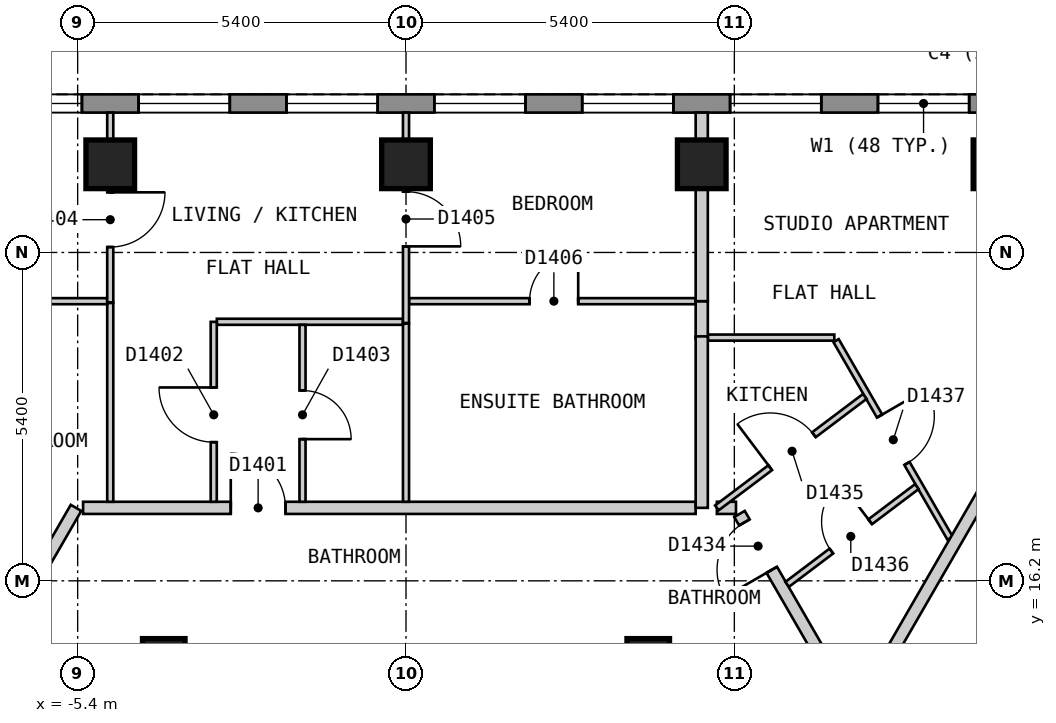
"""IFC4 building model, lengths in metres.
Left out: names, types, materials, properties, quantities, classifications, styles, units other than length and angle.
Written with IfcOpenShell. Run it as: python <this file> out.ifc"""

import sys

from ifc_helpers import new_model, si_unit, direction, frame, frame_2d, origin, origin_2d, place, context, subcontext, project, spatial, polyline, rectangle, outline, extrude, element, fill, save


model = new_model("IFC4")
c1 = context("Model", 3, precision=1e-05, world=origin(), true_north=direction((0.0, 1.0)))
c2 = subcontext(c1, "Body", "Model", "MODEL_VIEW")
j1 = project(units=[si_unit("LENGTHUNIT", "METRE"), si_unit("PLANEANGLEUNIT", "RADIAN")], contexts=[c1])
p1 = place(None, origin())
s1 = spatial("IfcSite", under=j1, at=p1, CompositionType="ELEMENT")
p2 = place(p1, origin())
s2 = spatial("IfcBuilding", under=s1, at=p2, CompositionType="ELEMENT")
p3 = place(p2, frame((0.0, 0.0, 178.2)))
s3 = spatial("IfcBuildingStorey", under=s2, at=p3, CompositionType="ELEMENT", Elevation=178.2)
for number, where, z_axis, x_axis in (
    (1, (9.728, 23.05, 0.0), (0.0, 0.0, 1.0), (-1.0, 0.0, 0.0)),
    (2, (4.864, 23.05, 0.0), (0.0, 0.0, 1.0), (-1.0, 0.0, 0.0)),
    (3, (0.0, 23.05, 0.0), (0.0, 0.0, 1.0), (-1.0, 0.0, 0.0)),
    (4, (-4.864, 23.05, 0.0), (0.0, 0.0, 1.0), (-1.0, 0.0, 0.0)),
):
    element("IfcColumn", number, at=place(p3, frame(where, z_axis=z_axis, x_axis=x_axis)), inside=s3, PredefinedType="COLUMN", context=c2, shape_type="SweptSolid", body=[
        extrude(rectangle(XDim=0.8, YDim=0.8, at=origin_2d()), origin(), (0.0, 0.0, 1.0), 3.0),
    ])
for number, where, z_axis, x_axis in (
    (5, (3.984, 14.9, 0.0), (0.0, 0.0, 1.0), (1.0, 0.0, 0.0)),
    (6, (-3.984, 14.9, 0.0), (0.0, 0.0, 1.0), (1.0, 0.0, 0.0)),
):
    element("IfcColumn", number, at=place(p3, frame(where, z_axis=z_axis, x_axis=x_axis)), inside=s3, PredefinedType="COLUMN", context=c2, shape_type="SweptSolid", body=[
        extrude(rectangle(XDim=0.7, YDim=0.7, at=origin_2d()), origin(), (0.0, 0.0, 1.0), 3.0),
    ])
p4 = place(p3, frame((10.392, 24.05, 0.0), z_axis=(0.0, 0.0, 1.0), x_axis=(-1.0, 0.0, 0.0)))
e7 = element("IfcWall", 7, at=p4, inside=s3, PredefinedType="SOLIDWALL", context=c2, shape_type="SweptSolid", body=[
    extrude(outline(polyline([(0.0, -0.15), (20.784, -0.15), (20.704, 0.15), (0.08, 0.15), (0.0, -0.15)])), origin(), (0.0, 0.0, 1.0), 2.7),
])
p5 = place(p4, frame((1.13, 0.0, 0.15)))
e8 = element("IfcOpeningElement", 8, at=p5, cuts=e7, PredefinedType="OPENING", context=c2, shape_type="SweptSolid", body=[
    extrude(rectangle(XDim=1.5, YDim=2.1, at=frame_2d((0.75, 1.05))), frame((0.0, 0.16, 0.0), z_axis=(0.0, -1.0, 0.0), x_axis=(1.0, 0.0, 0.0)), (0.0, 0.0, 1.0), 0.32),
])
p6 = place(p4, frame((3.562, 0.0, 0.15)))
e9 = element("IfcOpeningElement", 9, at=p6, cuts=e7, PredefinedType="OPENING", context=c2, shape_type="SweptSolid", body=[
    extrude(rectangle(XDim=1.5, YDim=2.1, at=frame_2d((0.75, 1.05))), frame((0.0, 0.16, 0.0), z_axis=(0.0, -1.0, 0.0), x_axis=(1.0, 0.0, 0.0)), (0.0, 0.0, 1.0), 0.32),
])
p7 = place(p4, frame((5.994, 0.0, 0.15)))
e10 = element("IfcOpeningElement", 10, at=p7, cuts=e7, PredefinedType="OPENING", context=c2, shape_type="SweptSolid", body=[
    extrude(rectangle(XDim=1.5, YDim=2.1, at=frame_2d((0.75, 1.05))), frame((0.0, 0.16, 0.0), z_axis=(0.0, -1.0, 0.0), x_axis=(1.0, 0.0, 0.0)), (0.0, 0.0, 1.0), 0.32),
])
p8 = place(p4, frame((8.426, 0.0, 0.15)))
e11 = element("IfcOpeningElement", 11, at=p8, cuts=e7, PredefinedType="OPENING", context=c2, shape_type="SweptSolid", body=[
    extrude(rectangle(XDim=1.5, YDim=2.1, at=frame_2d((0.75, 1.05))), frame((0.0, 0.16, 0.0), z_axis=(0.0, -1.0, 0.0), x_axis=(1.0, 0.0, 0.0)), (0.0, 0.0, 1.0), 0.32),
])
p9 = place(p4, frame((10.858, 0.0, 0.15)))
e12 = element("IfcOpeningElement", 12, at=p9, cuts=e7, PredefinedType="OPENING", context=c2, shape_type="SweptSolid", body=[
    extrude(rectangle(XDim=1.5, YDim=2.1, at=frame_2d((0.75, 1.05))), frame((0.0, 0.16, 0.0), z_axis=(0.0, -1.0, 0.0), x_axis=(1.0, 0.0, 0.0)), (0.0, 0.0, 1.0), 0.32),
])
p10 = place(p4, frame((13.29, 0.0, 0.15)))
e13 = element("IfcOpeningElement", 13, at=p10, cuts=e7, PredefinedType="OPENING", context=c2, shape_type="SweptSolid", body=[
    extrude(rectangle(XDim=1.5, YDim=2.1, at=frame_2d((0.75, 1.05))), frame((0.0, 0.16, 0.0), z_axis=(0.0, -1.0, 0.0), x_axis=(1.0, 0.0, 0.0)), (0.0, 0.0, 1.0), 0.32),
])
p11 = place(p4, frame((15.722, 0.0, 0.15)))
e14 = element("IfcOpeningElement", 14, at=p11, cuts=e7, PredefinedType="OPENING", context=c2, shape_type="SweptSolid", body=[
    extrude(rectangle(XDim=1.5, YDim=2.1, at=frame_2d((0.75, 1.05))), frame((0.0, 0.16, 0.0), z_axis=(0.0, -1.0, 0.0), x_axis=(1.0, 0.0, 0.0)), (0.0, 0.0, 1.0), 0.32),
])
p12 = place(p4, frame((18.154, 0.0, 0.15)))
e15 = element("IfcOpeningElement", 15, at=p12, cuts=e7, PredefinedType="OPENING", context=c2, shape_type="SweptSolid", body=[
    extrude(rectangle(XDim=1.5, YDim=2.1, at=frame_2d((0.75, 1.05))), frame((0.0, 0.16, 0.0), z_axis=(0.0, -1.0, 0.0), x_axis=(1.0, 0.0, 0.0)), (0.0, 0.0, 1.0), 0.32),
])
p13 = place(p3, frame((5.485, 17.3, 0.0), z_axis=(0.0, 0.0, 1.0), x_axis=(0.499965832213, -0.866045129667, 0.0)))
e16 = element("IfcWall", 16, at=p13, inside=s3, PredefinedType="PARTITIONING", context=c2, shape_type="SweptSolid", body=[
    extrude(rectangle(XDim=10.739, YDim=0.2, at=frame_2d((5.369, 0.0))), origin(), (0.0, 0.0, 1.0), 2.7),
])
p14 = place(p13, frame((9.048, 0.0, 0.0)))
e17 = element("IfcOpeningElement", 17, at=p14, cuts=e16, PredefinedType="OPENING", context=c2, shape_type="SweptSolid", body=[
    extrude(rectangle(XDim=1.0, YDim=2.1, at=frame_2d((0.5, 1.05))), frame((0.0, 0.11, 0.0), z_axis=(0.0, -1.0, 0.0), x_axis=(1.0, 0.0, 0.0)), (0.0, 0.0, 1.0), 0.22),
])
p15 = place(p13, frame((0.161, 0.0, 0.0)))
e18 = element("IfcOpeningElement", 18, at=p15, cuts=e16, PredefinedType="OPENING", context=c2, shape_type="SweptSolid", body=[
    extrude(rectangle(XDim=0.9, YDim=2.1, at=frame_2d((0.45, 1.05))), frame((0.0, 0.11, 0.0), z_axis=(0.0, -1.0, 0.0), x_axis=(1.0, 0.0, 0.0)), (0.0, 0.0, 1.0), 0.22),
])
p16 = place(p3, frame((-5.311, 17.4, 0.0), z_axis=(0.0, 0.0, 1.0), x_axis=(1.0, 0.0, 0.0)))
e19 = element("IfcWall", 19, at=p16, inside=s3, PredefinedType="PARTITIONING", context=c2, shape_type="SweptSolid", body=[
    extrude(rectangle(XDim=10.075, YDim=0.2, at=frame_2d((5.038, 0.0))), origin(), (0.0, 0.0, 1.0), 2.7),
])
p17 = place(p16, frame((2.429, 0.0, 0.0)))
e20 = element("IfcOpeningElement", 20, at=p17, cuts=e19, PredefinedType="OPENING", context=c2, shape_type="SweptSolid", body=[
    extrude(rectangle(XDim=0.9, YDim=2.1, at=frame_2d((0.45, 1.05))), frame((0.0, 0.11, 0.0), z_axis=(0.0, -1.0, 0.0), x_axis=(1.0, 0.0, 0.0)), (0.0, 0.0, 1.0), 0.22),
])
p18 = place(p3, frame((5.113, 17.4, 0.0), z_axis=(0.0, 0.0, 1.0), x_axis=(1.0, 0.0, 0.0)))
e21 = element("IfcWall", 21, at=p18, inside=s3, PredefinedType="PARTITIONING", context=c2, shape_type="SweptSolid", body=[
    extrude(rectangle(XDim=0.314, YDim=0.2, at=frame_2d((0.157, 0.0))), origin(), (0.0, 0.0, 1.0), 2.7),
])
p19 = place(p3, frame((-10.854, 8.0, 0.0), z_axis=(0.0, 0.0, 1.0), x_axis=(0.499997637144, 0.866026767976, 0.0)))
e22 = element("IfcWall", 22, at=p19, inside=s3, PredefinedType="PARTITIONING", context=c2, shape_type="SweptSolid", body=[
    extrude(rectangle(XDim=10.854, YDim=0.2, at=frame_2d((5.427, 0.0))), origin(), (0.0, 0.0, 1.0), 2.7),
])
p20 = place(p19, frame((0.721, 0.0, 0.0)))
e23 = element("IfcOpeningElement", 23, at=p20, cuts=e22, PredefinedType="OPENING", context=c2, shape_type="SweptSolid", body=[
    extrude(rectangle(XDim=1.0, YDim=2.1, at=frame_2d((0.5, 1.05))), frame((0.0, 0.11, 0.0), z_axis=(0.0, -1.0, 0.0), x_axis=(1.0, 0.0, 0.0)), (0.0, 0.0, 1.0), 0.22),
])
p21 = place(p3, frame((7.073, 20.15, 0.0), z_axis=(0.0, 0.0, 1.0), x_axis=(0.499917691695, -0.866072919292, 0.0)))
e24 = element("IfcWall", 24, at=p21, inside=s3, PredefinedType="PARTITIONING", context=c2, shape_type="SweptSolid", body=[
    extrude(rectangle(XDim=3.753, YDim=0.1, at=frame_2d((1.876, 0.0))), origin(), (0.0, 0.0, 1.0), 2.7),
])
p22 = place(p21, frame((1.432, 0.0, 0.0)))
e25 = element("IfcOpeningElement", 25, at=p22, cuts=e24, PredefinedType="OPENING", context=c2, shape_type="SweptSolid", body=[
    extrude(rectangle(XDim=0.9, YDim=2.1, at=frame_2d((0.45, 1.05))), frame((0.0, 0.06, 0.0), z_axis=(0.0, -1.0, 0.0), x_axis=(1.0, 0.0, 0.0)), (0.0, 0.0, 1.0), 0.12),
])
p23 = place(p3, frame((-4.864, 20.769, 0.0), z_axis=(0.0, 0.0, 1.0), x_axis=(0.0, -1.0, 0.0)))
e26 = element("IfcWall", 26, at=p23, inside=s3, PredefinedType="PARTITIONING", context=c2, shape_type="SweptSolid", body=[
    extrude(rectangle(XDim=3.269, YDim=0.1, at=frame_2d((1.635, 0.0))), origin(), (0.0, 0.0, 1.0), 2.7),
])
p24 = place(p3, frame((0.0, 20.43, 0.0), z_axis=(0.0, 0.0, 1.0), x_axis=(0.0, -1.0, 0.0)))
e27 = element("IfcWall", 27, at=p24, inside=s3, PredefinedType="PARTITIONING", context=c2, shape_type="SweptSolid", body=[
    extrude(rectangle(XDim=2.93, YDim=0.1, at=frame_2d((1.465, 0.0))), origin(), (0.0, 0.0, 1.0), 2.7),
])
p25 = place(p3, frame((4.964, 20.2, 0.0), z_axis=(0.0, 0.0, 1.0), x_axis=(1.0, 0.0, 0.0)))
e28 = element("IfcWall", 28, at=p25, inside=s3, PredefinedType="PARTITIONING", context=c2, shape_type="SweptSolid", body=[
    extrude(rectangle(XDim=2.08, YDim=0.1, at=frame_2d((1.04, 0.0))), origin(), (0.0, 0.0, 1.0), 2.7),
])
p26 = place(p3, frame((-3.111, 20.46, 0.0), z_axis=(0.0, 0.0, 1.0), x_axis=(1.0, 0.0, 0.0)))
e29 = element("IfcWall", 29, at=p26, inside=s3, PredefinedType="PARTITIONING", context=c2, shape_type="SweptSolid", body=[
    extrude(rectangle(XDim=3.061, YDim=0.1, at=frame_2d((1.531, 0.0))), origin(), (0.0, 0.0, 1.0), 2.7),
])
p27 = place(p3, frame((-7.331, 20.799, 0.0), z_axis=(0.0, 0.0, 1.0), x_axis=(1.0, 0.0, 0.0)))
e30 = element("IfcWall", 30, at=p27, inside=s3, PredefinedType="PARTITIONING", context=c2, shape_type="SweptSolid", body=[
    extrude(rectangle(XDim=2.417, YDim=0.1, at=frame_2d((1.208, 0.0))), origin(), (0.0, 0.0, 1.0), 2.7),
])
p28 = place(p3, frame((0.05, 20.799, 0.0), z_axis=(0.0, 0.0, 1.0), x_axis=(1.0, 0.0, 0.0)))
e31 = element("IfcWall", 31, at=p28, inside=s3, PredefinedType="PARTITIONING", context=c2, shape_type="SweptSolid", body=[
    extrude(rectangle(XDim=4.714, YDim=0.1, at=frame_2d((2.357, 0.0))), origin(), (0.0, 0.0, 1.0), 2.7),
])
p29 = place(p28, frame((1.982, 0.0, 0.0)))
e32 = element("IfcOpeningElement", 32, at=p29, cuts=e31, PredefinedType="OPENING", context=c2, shape_type="SweptSolid", body=[
    extrude(rectangle(XDim=0.8, YDim=2.1, at=frame_2d((0.4, 1.05))), frame((0.0, 0.06, 0.0), z_axis=(0.0, -1.0, 0.0), x_axis=(1.0, 0.0, 0.0)), (0.0, 0.0, 1.0), 0.12),
])
p30 = place(p3, frame((0.0, 20.44, 0.0), z_axis=(0.0, 0.0, 1.0), x_axis=(0.0, 1.0, 0.0)))
e33 = element("IfcWall", 33, at=p30, inside=s3, PredefinedType="PARTITIONING", context=c2, shape_type="SweptSolid", body=[
    extrude(rectangle(XDim=3.46, YDim=0.1, at=frame_2d((1.73, 0.0))), origin(), (0.0, 0.0, 1.0), 2.7),
])
p31 = place(p30, frame((1.26, 0.0, 0.0)))
e34 = element("IfcOpeningElement", 34, at=p31, cuts=e33, PredefinedType="OPENING", context=c2, shape_type="SweptSolid", body=[
    extrude(rectangle(XDim=0.9, YDim=2.1, at=frame_2d((0.45, 1.05))), frame((0.0, 0.06, 0.0), z_axis=(0.0, -1.0, 0.0), x_axis=(1.0, 0.0, 0.0)), (0.0, 0.0, 1.0), 0.12),
])
p32 = place(p3, frame((-3.162, 17.5, 0.0), z_axis=(0.0, 0.0, 1.0), x_axis=(0.0, 1.0, 0.0)))
e35 = element("IfcWall", 35, at=p32, inside=s3, PredefinedType="PARTITIONING", context=c2, shape_type="SweptSolid", body=[
    extrude(rectangle(XDim=2.959, YDim=0.1, at=frame_2d((1.479, 0.0))), origin(), (0.0, 0.0, 1.0), 2.7),
])
p33 = place(p32, frame((0.98, 0.0, 0.0)))
e36 = element("IfcOpeningElement", 36, at=p33, cuts=e35, PredefinedType="OPENING", context=c2, shape_type="SweptSolid", body=[
    extrude(rectangle(XDim=0.9, YDim=2.1, at=frame_2d((0.45, 1.05))), frame((0.0, 0.06, 0.0), z_axis=(0.0, -1.0, 0.0), x_axis=(1.0, 0.0, 0.0)), (0.0, 0.0, 1.0), 0.12),
])
p34 = place(p3, frame((-4.864, 20.779, 0.0), z_axis=(0.0, 0.0, 1.0), x_axis=(0.0, 1.0, 0.0)))
e37 = element("IfcWall", 37, at=p34, inside=s3, PredefinedType="PARTITIONING", context=c2, shape_type="SweptSolid", body=[
    extrude(rectangle(XDim=3.121, YDim=0.1, at=frame_2d((1.561, 0.0))), origin(), (0.0, 0.0, 1.0), 2.7),
])
p35 = place(p34, frame((0.91, 0.0, 0.0)))
e38 = element("IfcOpeningElement", 38, at=p35, cuts=e37, PredefinedType="OPENING", context=c2, shape_type="SweptSolid", body=[
    extrude(rectangle(XDim=0.9, YDim=2.1, at=frame_2d((0.45, 1.05))), frame((0.0, 0.06, 0.0), z_axis=(0.0, -1.0, 0.0), x_axis=(1.0, 0.0, 0.0)), (0.0, 0.0, 1.0), 0.12),
])
p36 = place(p3, frame((-1.702, 17.5, 0.0), z_axis=(0.0, 0.0, 1.0), x_axis=(0.0, 1.0, 0.0)))
e39 = element("IfcWall", 39, at=p36, inside=s3, PredefinedType="PARTITIONING", context=c2, shape_type="SweptSolid", body=[
    extrude(rectangle(XDim=2.91, YDim=0.1, at=frame_2d((1.455, 0.0))), origin(), (0.0, 0.0, 1.0), 2.7),
])
p37 = place(p36, frame((1.03, 0.0, 0.0)))
e40 = element("IfcOpeningElement", 40, at=p37, cuts=e39, PredefinedType="OPENING", context=c2, shape_type="SweptSolid", body=[
    extrude(rectangle(XDim=0.8, YDim=2.1, at=frame_2d((0.4, 1.05))), frame((0.0, 0.06, 0.0), z_axis=(0.0, -1.0, 0.0), x_axis=(1.0, 0.0, 0.0)), (0.0, 0.0, 1.0), 0.12),
])
p38 = place(p3, frame((6.269, 16.142, 0.0), z_axis=(0.0, 0.0, 1.0), x_axis=(0.798549086509, 0.601929693931, 0.0)))
e41 = element("IfcWall", 41, at=p38, inside=s3, PredefinedType="PARTITIONING", context=c2, shape_type="SweptSolid", body=[
    extrude(rectangle(XDim=2.67, YDim=0.1, at=frame_2d((1.335, 0.0))), origin(), (0.0, 0.0, 1.0), 2.7),
])
p39 = place(p38, frame((0.91, 0.0, 0.0)))
e42 = element("IfcOpeningElement", 42, at=p39, cuts=e41, PredefinedType="OPENING", context=c2, shape_type="SweptSolid", body=[
    extrude(rectangle(XDim=0.8, YDim=2.1, at=frame_2d((0.4, 1.05))), frame((0.0, 0.06, 0.0), z_axis=(0.0, -1.0, 0.0), x_axis=(1.0, 0.0, 0.0)), (0.0, 0.0, 1.0), 0.12),
])
p40 = place(p3, frame((5.113, 17.4, 0.0), z_axis=(0.0, 0.0, 1.0), x_axis=(0.798718434647, 0.601704962714, 0.0)))
e43 = element("IfcWall", 43, at=p40, inside=s3, PredefinedType="PARTITIONING", context=c2, shape_type="SweptSolid", body=[
    extrude(rectangle(XDim=3.045, YDim=0.1, at=frame_2d((1.522, 0.0))), origin(), (0.0, 0.0, 1.0), 2.7),
])
p41 = place(p40, frame((1.098, 0.0, 0.0)))
e44 = element("IfcOpeningElement", 44, at=p41, cuts=e43, PredefinedType="OPENING", context=c2, shape_type="SweptSolid", body=[
    extrude(rectangle(XDim=0.9, YDim=2.1, at=frame_2d((0.45, 1.05))), frame((0.0, 0.06, 0.0), z_axis=(0.0, -1.0, 0.0), x_axis=(1.0, 0.0, 0.0)), (0.0, 0.0, 1.0), 0.12),
])
p42 = place(p3, frame((4.864, 20.799, 0.0), z_axis=(0.0, 0.0, 1.0), x_axis=(0.0, -1.0, 0.0)))
e45 = element("IfcWall", 45, at=p42, inside=s3, PredefinedType="PARTITIONING", context=c2, shape_type="SweptSolid", body=[
    extrude(rectangle(XDim=0.619, YDim=0.2, at=frame_2d((0.31, 0.0))), origin(), (0.0, 0.0, 1.0), 2.7),
])
p43 = place(p3, frame((7.448, 14.1, 0.0), z_axis=(0.0, 0.0, 1.0), x_axis=(0.500013426303, 0.866017651966, 0.0)))
e46 = element("IfcWall", 46, at=p43, inside=s3, PredefinedType="PARTITIONING", context=c2, shape_type="SweptSolid", body=[
    extrude(rectangle(XDim=4.358, YDim=0.2, at=frame_2d((2.179, 0.0))), origin(), (0.0, 0.0, 1.0), 2.7),
])
p44 = place(p3, frame((4.864, 17.4, 0.0), z_axis=(0.0, 0.0, 1.0), x_axis=(0.0, 1.0, 0.0)))
e47 = element("IfcWall", 47, at=p44, inside=s3, PredefinedType="PARTITIONING", context=c2, shape_type="SweptSolid", body=[
    extrude(rectangle(XDim=2.82, YDim=0.2, at=frame_2d((1.41, 0.0))), origin(), (0.0, 0.0, 1.0), 2.7),
])
p45 = place(p3, frame((4.864, 20.799, 0.0), z_axis=(0.0, 0.0, 1.0), x_axis=(0.0, 1.0, 0.0)))
e48 = element("IfcWall", 48, at=p45, inside=s3, PredefinedType="PARTITIONING", context=c2, shape_type="SweptSolid", body=[
    extrude(rectangle(XDim=3.101, YDim=0.2, at=frame_2d((1.55, 0.0))), origin(), (0.0, 0.0, 1.0), 2.7),
])
p46 = place(p5, origin())
e49 = element("IfcWindow", 49, at=p46, inside=s3, PartitioningType="SINGLE_PANEL", PredefinedType="WINDOW", context=c2, shape_type="SweptSolid", body=[
    extrude(rectangle(XDim=1.5, YDim=2.1, at=frame_2d((0.75, 1.05))), frame((0.0, 0.03, 0.0), z_axis=(0.0, -1.0, 0.0), x_axis=(1.0, 0.0, 0.0)), (0.0, 0.0, 1.0), 0.06),
])
fill(e8, e49)
p47 = place(p6, origin())
e50 = element("IfcWindow", 50, at=p47, inside=s3, PartitioningType="SINGLE_PANEL", PredefinedType="WINDOW", context=c2, shape_type="SweptSolid", body=[
    extrude(rectangle(XDim=1.5, YDim=2.1, at=frame_2d((0.75, 1.05))), frame((0.0, 0.03, 0.0), z_axis=(0.0, -1.0, 0.0), x_axis=(1.0, 0.0, 0.0)), (0.0, 0.0, 1.0), 0.06),
])
fill(e9, e50)
p48 = place(p7, origin())
e51 = element("IfcWindow", 51, at=p48, inside=s3, PartitioningType="SINGLE_PANEL", PredefinedType="WINDOW", context=c2, shape_type="SweptSolid", body=[
    extrude(rectangle(XDim=1.5, YDim=2.1, at=frame_2d((0.75, 1.05))), frame((0.0, 0.03, 0.0), z_axis=(0.0, -1.0, 0.0), x_axis=(1.0, 0.0, 0.0)), (0.0, 0.0, 1.0), 0.06),
])
fill(e10, e51)
p49 = place(p8, origin())
e52 = element("IfcWindow", 52, at=p49, inside=s3, PartitioningType="SINGLE_PANEL", PredefinedType="WINDOW", context=c2, shape_type="SweptSolid", body=[
    extrude(rectangle(XDim=1.5, YDim=2.1, at=frame_2d((0.75, 1.05))), frame((0.0, 0.03, 0.0), z_axis=(0.0, -1.0, 0.0), x_axis=(1.0, 0.0, 0.0)), (0.0, 0.0, 1.0), 0.06),
])
fill(e11, e52)
p50 = place(p9, origin())
e53 = element("IfcWindow", 53, at=p50, inside=s3, PartitioningType="SINGLE_PANEL", PredefinedType="WINDOW", context=c2, shape_type="SweptSolid", body=[
    extrude(rectangle(XDim=1.5, YDim=2.1, at=frame_2d((0.75, 1.05))), frame((0.0, 0.03, 0.0), z_axis=(0.0, -1.0, 0.0), x_axis=(1.0, 0.0, 0.0)), (0.0, 0.0, 1.0), 0.06),
])
fill(e12, e53)
p51 = place(p10, origin())
e54 = element("IfcWindow", 54, at=p51, inside=s3, PartitioningType="SINGLE_PANEL", PredefinedType="WINDOW", context=c2, shape_type="SweptSolid", body=[
    extrude(rectangle(XDim=1.5, YDim=2.1, at=frame_2d((0.75, 1.05))), frame((0.0, 0.03, 0.0), z_axis=(0.0, -1.0, 0.0), x_axis=(1.0, 0.0, 0.0)), (0.0, 0.0, 1.0), 0.06),
])
fill(e13, e54)
p52 = place(p11, origin())
e55 = element("IfcWindow", 55, at=p52, inside=s3, PartitioningType="SINGLE_PANEL", PredefinedType="WINDOW", context=c2, shape_type="SweptSolid", body=[
    extrude(rectangle(XDim=1.5, YDim=2.1, at=frame_2d((0.75, 1.05))), frame((0.0, 0.03, 0.0), z_axis=(0.0, -1.0, 0.0), x_axis=(1.0, 0.0, 0.0)), (0.0, 0.0, 1.0), 0.06),
])
fill(e14, e55)
p53 = place(p17, origin())
e56 = element("IfcDoor", 56, at=p53, inside=s3, OperationType="SINGLE_SWING_LEFT", PredefinedType="DOOR", context=c2, shape_type="SweptSolid", body=[
    extrude(rectangle(XDim=0.9, YDim=2.1, at=frame_2d((0.45, 1.05))), frame((0.0, 0.025, 0.0), z_axis=(0.0, -1.0, 0.0), x_axis=(1.0, 0.0, 0.0)), (0.0, 0.0, 1.0), 0.05),
])
fill(e20, e56)
p54 = place(p33, origin())
e57 = element("IfcDoor", 57, at=p54, inside=s3, OperationType="SINGLE_SWING_RIGHT", PredefinedType="DOOR", context=c2, shape_type="SweptSolid", body=[
    extrude(rectangle(XDim=0.9, YDim=2.1, at=frame_2d((0.45, 1.05))), frame((0.0, 0.025, 0.0), z_axis=(0.0, -1.0, 0.0), x_axis=(1.0, 0.0, 0.0)), (0.0, 0.0, 1.0), 0.05),
])
fill(e36, e57)
p55 = place(p37, origin())
e58 = element("IfcDoor", 58, at=p55, inside=s3, OperationType="SINGLE_SWING_LEFT", PredefinedType="DOOR", context=c2, shape_type="SweptSolid", body=[
    extrude(rectangle(XDim=0.8, YDim=2.1, at=frame_2d((0.4, 1.05))), frame((0.0, 0.025, 0.0), z_axis=(0.0, -1.0, 0.0), x_axis=(1.0, 0.0, 0.0)), (0.0, 0.0, 1.0), 0.05),
])
fill(e40, e58)
p56 = place(p35, origin())
e59 = element("IfcDoor", 59, at=p56, inside=s3, OperationType="SINGLE_SWING_RIGHT", PredefinedType="DOOR", context=c2, shape_type="SweptSolid", body=[
    extrude(rectangle(XDim=0.9, YDim=2.1, at=frame_2d((0.45, 1.05))), frame((0.0, 0.025, 0.0), z_axis=(0.0, -1.0, 0.0), x_axis=(1.0, 0.0, 0.0)), (0.0, 0.0, 1.0), 0.05),
])
fill(e38, e59)
p57 = place(p31, origin())
e60 = element("IfcDoor", 60, at=p57, inside=s3, OperationType="SINGLE_SWING_LEFT", PredefinedType="DOOR", context=c2, shape_type="SweptSolid", body=[
    extrude(rectangle(XDim=0.9, YDim=2.1, at=frame_2d((0.45, 1.05))), frame((0.0, 0.025, 0.0), z_axis=(0.0, -1.0, 0.0), x_axis=(1.0, 0.0, 0.0)), (0.0, 0.0, 1.0), 0.05),
])
fill(e34, e60)
p58 = place(p29, origin())
e61 = element("IfcDoor", 61, at=p58, inside=s3, OperationType="SINGLE_SWING_RIGHT", PredefinedType="DOOR", context=c2, shape_type="SweptSolid", body=[
    extrude(rectangle(XDim=0.8, YDim=2.1, at=frame_2d((0.4, 1.05))), frame((0.0, 0.025, 0.0), z_axis=(0.0, -1.0, 0.0), x_axis=(1.0, 0.0, 0.0)), (0.0, 0.0, 1.0), 0.05),
])
fill(e32, e61)
p59 = place(p15, origin())
e62 = element("IfcDoor", 62, at=p59, inside=s3, OperationType="SINGLE_SWING_RIGHT", PredefinedType="DOOR", context=c2, shape_type="SweptSolid", body=[
    extrude(rectangle(XDim=0.9, YDim=2.1, at=frame_2d((0.45, 1.05))), frame((0.0, 0.025, 0.0), z_axis=(0.0, -1.0, 0.0), x_axis=(1.0, 0.0, 0.0)), (0.0, 0.0, 1.0), 0.05),
])
fill(e18, e62)
p60 = place(p41, origin())
e63 = element("IfcDoor", 63, at=p60, inside=s3, OperationType="SINGLE_SWING_LEFT", PredefinedType="DOOR", context=c2, shape_type="SweptSolid", body=[
    extrude(rectangle(XDim=0.9, YDim=2.1, at=frame_2d((0.45, 1.05))), frame((0.0, 0.025, 0.0), z_axis=(0.0, -1.0, 0.0), x_axis=(1.0, 0.0, 0.0)), (0.0, 0.0, 1.0), 0.05),
])
fill(e44, e63)
p61 = place(p39, origin())
e64 = element("IfcDoor", 64, at=p61, inside=s3, OperationType="SINGLE_SWING_RIGHT", PredefinedType="DOOR", context=c2, shape_type="SweptSolid", body=[
    extrude(rectangle(XDim=0.8, YDim=2.1, at=frame_2d((0.4, 1.05))), frame((0.0, 0.025, 0.0), z_axis=(0.0, -1.0, 0.0), x_axis=(1.0, 0.0, 0.0)), (0.0, 0.0, 1.0), 0.05),
])
fill(e42, e64)
p62 = place(p22, origin())
e65 = element("IfcDoor", 65, at=p62, inside=s3, OperationType="SINGLE_SWING_LEFT", PredefinedType="DOOR", context=c2, shape_type="SweptSolid", body=[
    extrude(rectangle(XDim=0.9, YDim=2.1, at=frame_2d((0.45, 1.05))), frame((0.0, 0.025, 0.0), z_axis=(0.0, -1.0, 0.0), x_axis=(1.0, 0.0, 0.0)), (0.0, 0.0, 1.0), 0.05),
])
fill(e25, e65)
save(model, sys.argv[1])
